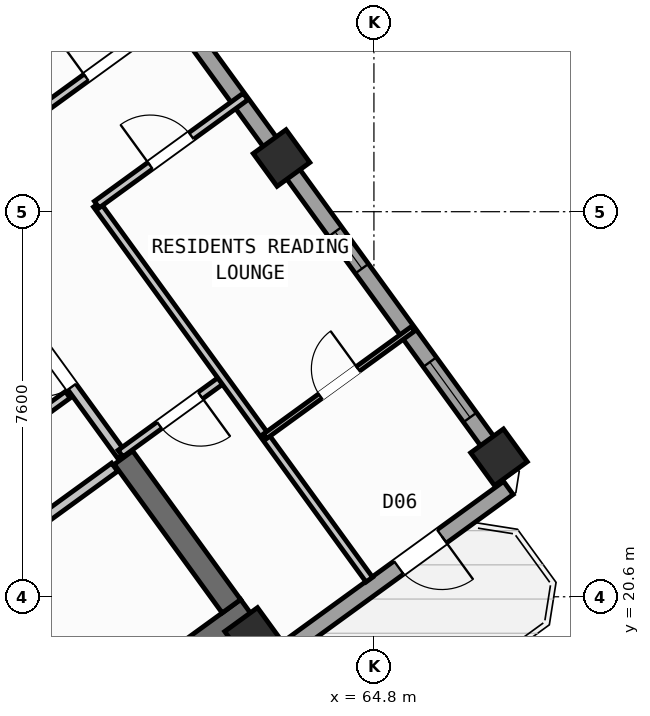
"""IFC4 building model, lengths in metres.
Left out: names, types, materials, properties, quantities, classifications, styles, units other than length and angle.
Written with IfcOpenShell. Run it as: python <this file> out.ifc"""

import sys

from ifc_helpers import new_model, si_unit, direction, frame, frame_2d, origin, origin_2d, place, context, subcontext, project, spatial, rectangle, hollow_rectangle, extrude, source, transform, mapped, element, fill, save


model = new_model("IFC4")
c1 = context("Model", 3, precision=1e-05, world=origin(), true_north=direction((0.0, 1.0)))
c2 = subcontext(c1, "Body", "Model", "MODEL_VIEW")
j1 = project(units=[si_unit("LENGTHUNIT", "METRE"), si_unit("PLANEANGLEUNIT", "RADIAN")], contexts=[c1])
p1 = place(None, origin())
s1 = spatial("IfcSite", under=j1, at=p1, CompositionType="ELEMENT")
p2 = place(p1, origin())
s2 = spatial("IfcBuilding", under=s1, at=p2, CompositionType="ELEMENT")
p3 = place(p2, frame((0.0, 0.0, 207.6)))
s3 = spatial("IfcBuildingStorey", under=s2, at=p3, CompositionType="ELEMENT", Elevation=207.6)
p4 = place(p3, frame((52.399, 13.169, 0.0), z_axis=(0.0, 0.0, 1.0), x_axis=(0.809022352778, 0.587777877013, 0.0)))
e1 = element("IfcWall", 1, at=p4, inside=s3, PredefinedType="SHEAR", context=c2, shape_type="SweptSolid", body=[
    extrude(rectangle(XDim=12.24, YDim=0.45, at=frame_2d((6.12, 0.0))), origin(), (0.0, 0.0, 1.0), 3.35),
])
p5 = place(p3, frame((61.988, 20.413, 0.0), z_axis=(0.0, 0.0, 1.0), x_axis=(-0.587819244441, 0.808992296542, 0.0)))
e2 = element("IfcWall", 2, at=p5, inside=s3, PredefinedType="SHEAR", context=c2, shape_type="SweptSolid", body=[
    extrude(rectangle(XDim=3.625, YDim=0.45, at=frame_2d((1.812, 0.0))), origin(), (0.0, 0.0, 1.0), 3.35),
])
m1 = source(origin(), c2, "Body", "SweptSolid", [
    extrude(hollow_rectangle(XDim=0.8, YDim=0.8, WallThickness=0.032, at=origin_2d()), origin(), (0.0, 0.0, 1.0), 3.6),
])
for number, where, z_axis, x_axis in (
    (3, (62.414, 19.827, 0.0), (0.0, 0.0, 1.0), (0.809, 0.588, 0.0)),
    (4, (67.268, 23.354, 0.0), (0.0, 0.0, 1.0), (0.809, 0.588, 0.0)),
    (5, (62.977, 29.259, 0.0), (0.0, 0.0, 1.0), (0.809, 0.588, 0.0)),
):
    element("IfcColumn", number, at=place(p3, frame(where, z_axis=z_axis, x_axis=x_axis)), inside=s3, PredefinedType="COLUMN", context=c2, shape_type="MappedRepresentation", body=[
        mapped(m1, transform((0.0, 0.0, 0.0), scale=1.0)),
    ])
p6 = place(p3, frame((54.81, 40.5, 0.0), z_axis=(0.0, 0.0, 1.0), x_axis=(0.587783625747, -0.809018176127, 0.0)))
e6 = element("IfcWall", 6, at=p6, inside=s3, PredefinedType="STANDARD", context=c2, shape_type="SweptSolid", body=[
    extrude(rectangle(XDim=21.587, YDim=0.32, at=frame_2d((10.794, 0.0))), origin(), (0.0, 0.0, 1.0), 2.825),
])
p7 = place(p6, frame((1.403, 0.0, 0.9)))
e7 = element("IfcOpeningElement", 7, at=p7, cuts=e6, PredefinedType="OPENING", context=c2, shape_type="SweptSolid", body=[
    extrude(rectangle(XDim=1.65, YDim=1.45, at=frame_2d((0.825, 0.725))), frame((0.0, 0.17, 0.0), z_axis=(0.0, -1.0, 0.0), x_axis=(1.0, 0.0, 0.0)), (0.0, 0.0, 1.0), 0.34),
])
p8 = place(p6, frame((4.695, 0.0, 1.0)))
e8 = element("IfcOpeningElement", 8, at=p8, cuts=e6, PredefinedType="OPENING", context=c2, shape_type="SweptSolid", body=[
    extrude(rectangle(XDim=0.9, YDim=1.25, at=frame_2d((0.45, 0.625))), frame((0.0, 0.17, 0.0), z_axis=(0.0, -1.0, 0.0), x_axis=(1.0, 0.0, 0.0)), (0.0, 0.0, 1.0), 0.34),
])
p9 = place(p6, frame((7.604, 0.0, 0.95)))
e9 = element("IfcOpeningElement", 9, at=p9, cuts=e6, PredefinedType="OPENING", context=c2, shape_type="SweptSolid", body=[
    extrude(rectangle(XDim=1.95, YDim=1.35, at=frame_2d((0.975, 0.675))), frame((0.0, 0.17, 0.0), z_axis=(0.0, -1.0, 0.0), x_axis=(1.0, 0.0, 0.0)), (0.0, 0.0, 1.0), 0.34),
])
p10 = place(p6, frame((15.692, 0.0, 1.0)))
e10 = element("IfcOpeningElement", 10, at=p10, cuts=e6, PredefinedType="OPENING", context=c2, shape_type="SweptSolid", body=[
    extrude(rectangle(XDim=0.9, YDim=1.25, at=frame_2d((0.45, 0.625))), frame((0.0, 0.17, 0.0), z_axis=(0.0, -1.0, 0.0), x_axis=(1.0, 0.0, 0.0)), (0.0, 0.0, 1.0), 0.34),
])
p11 = place(p6, frame((18.872, 0.0, 0.9)))
e11 = element("IfcOpeningElement", 11, at=p11, cuts=e6, PredefinedType="OPENING", context=c2, shape_type="SweptSolid", body=[
    extrude(rectangle(XDim=1.35, YDim=1.45, at=frame_2d((0.675, 0.725))), frame((0.0, 0.17, 0.0), z_axis=(0.0, -1.0, 0.0), x_axis=(1.0, 0.0, 0.0)), (0.0, 0.0, 1.0), 0.34),
])
p12 = place(p3, frame((67.454, 22.747, 0.0), z_axis=(0.0, 0.0, 1.0), x_axis=(-0.809021120468, -0.587779573171, 0.0)))
e12 = element("IfcWall", 12, at=p12, inside=s3, PredefinedType="STANDARD", context=c2, shape_type="SweptSolid", body=[
    extrude(rectangle(XDim=17.588, YDim=0.32, at=frame_2d((8.794, 0.0))), origin(), (0.0, 0.0, 1.0), 3.35),
])
p13 = place(p12, frame((1.624, 0.0, 0.0)))
e13 = element("IfcOpeningElement", 13, at=p13, cuts=e12, PredefinedType="OPENING", context=c2, shape_type="SweptSolid", body=[
    extrude(rectangle(XDim=1.05, YDim=2.15, at=frame_2d((0.525, 1.075))), frame((0.0, 0.17, 0.0), z_axis=(0.0, -1.0, 0.0), x_axis=(1.0, 0.0, 0.0)), (0.0, 0.0, 1.0), 0.34),
])
p14 = place(p12, frame((8.344, 0.0, 0.9)))
e14 = element("IfcOpeningElement", 14, at=p14, cuts=e12, PredefinedType="OPENING", context=c2, shape_type="SweptSolid", body=[
    extrude(rectangle(XDim=1.65, YDim=1.45, at=frame_2d((0.825, 0.725))), frame((0.0, 0.17, 0.0), z_axis=(0.0, -1.0, 0.0), x_axis=(1.0, 0.0, 0.0)), (0.0, 0.0, 1.0), 0.34),
])
p15 = place(p12, frame((13.594, 0.0, 0.9)))
e15 = element("IfcOpeningElement", 15, at=p15, cuts=e12, PredefinedType="OPENING", context=c2, shape_type="SweptSolid", body=[
    extrude(rectangle(XDim=1.65, YDim=1.45, at=frame_2d((0.825, 0.725))), frame((0.0, 0.17, 0.0), z_axis=(0.0, -1.0, 0.0), x_axis=(1.0, 0.0, 0.0)), (0.0, 0.0, 1.0), 0.34),
])
p16 = place(p3, frame((58.41, 18.327, 0.0), z_axis=(0.0, 0.0, 1.0), x_axis=(-0.58776738483, 0.809029975545, 0.0)))
e16 = element("IfcWall", 16, at=p16, inside=s3, PredefinedType="SHEAR", context=c2, shape_type="SweptSolid", body=[
    extrude(rectangle(XDim=3.16, YDim=0.26, at=frame_2d((1.58, 0.0))), origin(), (0.0, 0.0, 1.0), 3.35),
])
p17 = place(p3, frame((56.553, 20.884, 0.0), z_axis=(0.0, 0.0, 1.0), x_axis=(0.809041669066, 0.587751288995, 0.0)))
e17 = element("IfcWall", 17, at=p17, inside=s3, PredefinedType="STANDARD", context=c2, shape_type="SweptSolid", body=[
    extrude(rectangle(XDim=3.868, YDim=0.2, at=frame_2d((1.934, 0.0))), origin(), (0.0, 0.0, 1.0), 3.34),
])
p18 = place(p17, frame((0.55, 0.0, 0.0)))
e18 = element("IfcOpeningElement", 18, at=p18, cuts=e17, PredefinedType="OPENING", context=c2, shape_type="SweptSolid", body=[
    extrude(rectangle(XDim=0.86, YDim=2.05, at=frame_2d((0.43, 1.025))), frame((0.0, 0.11, 0.0), z_axis=(0.0, -1.0, 0.0), x_axis=(1.0, 0.0, 0.0)), (0.0, 0.0, 1.0), 0.22),
])
p19 = place(p3, frame((54.421, 21.436, 0.0), z_axis=(0.0, 0.0, 1.0), x_axis=(0.809013710463, 0.587789772183, 0.0)))
e19 = element("IfcWall", 19, at=p19, inside=s3, PredefinedType="PARTITIONING", context=c2, shape_type="SweptSolid", body=[
    extrude(rectangle(XDim=5.36, YDim=0.16, at=frame_2d((2.68, 0.0))), origin(), (0.0, 0.0, 1.0), 3.34),
])
p20 = place(p19, frame((1.4, 0.0, 0.0)))
e20 = element("IfcOpeningElement", 20, at=p20, cuts=e19, PredefinedType="OPENING", context=c2, shape_type="SweptSolid", body=[
    extrude(rectangle(XDim=0.86, YDim=2.05, at=frame_2d((0.43, 1.025))), frame((0.0, 0.09, 0.0), z_axis=(0.0, -1.0, 0.0), x_axis=(1.0, 0.0, 0.0)), (0.0, 0.0, 1.0), 0.18),
])
p21 = place(p3, frame((59.827, 23.386, 0.0), z_axis=(0.0, 0.0, 1.0), x_axis=(-0.587803840107, 0.809003489211, 0.0)))
e21 = element("IfcWall", 21, at=p21, inside=s3, PredefinedType="STANDARD", context=c2, shape_type="SweptSolid", body=[
    extrude(rectangle(XDim=2.96, YDim=0.2, at=frame_2d((1.48, 0.0))), origin(), (0.0, 0.0, 1.0), 3.34),
])
p22 = place(p21, frame((1.68, 0.0, 0.0)))
e22 = element("IfcOpeningElement", 22, at=p22, cuts=e21, PredefinedType="OPENING", context=c2, shape_type="SweptSolid", body=[
    extrude(rectangle(XDim=1.0, YDim=2.1, at=frame_2d((0.5, 1.05))), frame((0.0, 0.11, 0.0), z_axis=(0.0, -1.0, 0.0), x_axis=(1.0, 0.0, 0.0)), (0.0, 0.0, 1.0), 0.22),
])
p23 = place(p3, frame((59.798, 23.427, 0.0), z_axis=(0.0, 0.0, 1.0), x_axis=(0.809034604122, 0.587761013791, 0.0)))
e23 = element("IfcWall", 23, at=p23, inside=s3, PredefinedType="PARTITIONING", context=c2, shape_type="SweptSolid", body=[
    extrude(rectangle(XDim=2.51, YDim=0.16, at=frame_2d((1.255, 0.0))), origin(), (0.0, 0.0, 1.0), 3.34),
])
p24 = place(p23, frame((0.95, 0.0, 0.0)))
e24 = element("IfcOpeningElement", 24, at=p24, cuts=e23, PredefinedType="OPENING", context=c2, shape_type="SweptSolid", body=[
    extrude(rectangle(XDim=1.0, YDim=2.1, at=frame_2d((0.5, 1.05))), frame((0.0, 0.09, 0.0), z_axis=(0.0, -1.0, 0.0), x_axis=(1.0, 0.0, 0.0)), (0.0, 0.0, 1.0), 0.18),
])
p25 = place(p3, frame((64.709, 20.938, 0.0), z_axis=(0.0, 0.0, 1.0), x_axis=(-0.587776590479, 0.80902328748, 0.0)))
e25 = element("IfcWall", 25, at=p25, inside=s3, PredefinedType="PARTITIONING", context=c2, shape_type="SweptSolid", body=[
    extrude(rectangle(XDim=9.15, YDim=0.16, at=frame_2d((4.575, 0.0))), origin(), (0.0, 0.0, 1.0), 3.34),
])
p26 = place(p3, frame((59.331, 28.341, 0.0), z_axis=(0.0, 0.0, 1.0), x_axis=(0.809003564202, 0.587803736896, 0.0)))
e26 = element("IfcWall", 26, at=p26, inside=s3, PredefinedType="PARTITIONING", context=c2, shape_type="SweptSolid", body=[
    extrude(rectangle(XDim=3.63, YDim=0.16, at=frame_2d((1.815, 0.0))), origin(), (0.0, 0.0, 1.0), 3.34),
])
p27 = place(p26, frame((1.305, 0.0, 0.0)))
e27 = element("IfcOpeningElement", 27, at=p27, cuts=e26, PredefinedType="OPENING", context=c2, shape_type="SweptSolid", body=[
    extrude(rectangle(XDim=1.0, YDim=2.1, at=frame_2d((0.5, 1.05))), frame((0.0, 0.09, 0.0), z_axis=(0.0, -1.0, 0.0), x_axis=(1.0, 0.0, 0.0)), (0.0, 0.0, 1.0), 0.18),
])
p28 = place(p3, frame((58.067, 30.08, 0.0), z_axis=(0.0, 0.0, 1.0), x_axis=(0.809012309495, 0.587791700422, 0.0)))
e28 = element("IfcWall", 28, at=p28, inside=s3, PredefinedType="PARTITIONING", context=c2, shape_type="SweptSolid", body=[
    extrude(rectangle(XDim=3.63, YDim=0.16, at=frame_2d((1.815, 0.0))), origin(), (0.0, 0.0, 1.0), 3.34),
])
p29 = place(p28, frame((1.305, 0.0, 0.0)))
e29 = element("IfcOpeningElement", 29, at=p29, cuts=e28, PredefinedType="OPENING", context=c2, shape_type="SweptSolid", body=[
    extrude(rectangle(XDim=1.0, YDim=2.1, at=frame_2d((0.5, 1.05))), frame((0.0, 0.09, 0.0), z_axis=(0.0, -1.0, 0.0), x_axis=(1.0, 0.0, 0.0)), (0.0, 0.0, 1.0), 0.18),
])
p30 = place(p3, frame((62.653, 23.768, 0.0), z_axis=(0.0, 0.0, 1.0), x_axis=(0.809037198293, 0.58775744298, 0.0)))
e30 = element("IfcWall", 30, at=p30, inside=s3, PredefinedType="PARTITIONING", context=c2, shape_type="SweptSolid", body=[
    extrude(rectangle(XDim=3.61, YDim=0.11, at=frame_2d((1.805, 0.0))), origin(), (0.0, 0.0, 1.0), 3.34),
])
p31 = place(p30, frame((1.345, 0.0, 0.0)))
e31 = element("IfcOpeningElement", 31, at=p31, cuts=e30, PredefinedType="OPENING", context=c2, shape_type="SweptSolid", body=[
    extrude(rectangle(XDim=0.92, YDim=2.08, at=frame_2d((0.46, 1.04))), frame((0.0, 0.065, 0.0), z_axis=(0.0, -1.0, 0.0), x_axis=(1.0, 0.0, 0.0)), (0.0, 0.0, 1.0), 0.13),
])
m2 = source(origin(), c2, "Body", "SweptSolid", [
    extrude(rectangle(XDim=1.05, YDim=2.15, at=frame_2d((0.525, 1.075))), frame((0.0, 0.025, 0.0), z_axis=(0.0, -1.0, 0.0), x_axis=(1.0, 0.0, 0.0)), (0.0, 0.0, 1.0), 0.05),
])
p32 = place(p13, origin())
e32 = element("IfcDoor", 32, at=p32, inside=s3, OperationType="SINGLE_SWING_LEFT", PredefinedType="DOOR", context=c2, shape_type="MappedRepresentation", body=[
    mapped(m2, transform((0.0, 0.0, 0.0), scale=1.0)),
])
fill(e13, e32)
m3 = source(origin(), c2, "Body", "SweptSolid", [
    extrude(rectangle(XDim=0.9, YDim=1.25, at=frame_2d((0.45, 0.625))), frame((0.0, 0.03, 0.0), z_axis=(0.0, -1.0, 0.0), x_axis=(1.0, 0.0, 0.0)), (0.0, 0.0, 1.0), 0.06),
])
p33 = place(p10, origin())
e33 = element("IfcWindow", 33, at=p33, inside=s3, PartitioningType="SINGLE_PANEL", PredefinedType="WINDOW", context=c2, shape_type="MappedRepresentation", body=[
    mapped(m3, transform((0.0, 0.0, 0.0), scale=1.0)),
])
fill(e10, e33)
m4 = source(origin(), c2, "Body", "SweptSolid", [
    extrude(rectangle(XDim=1.35, YDim=1.45, at=frame_2d((0.675, 0.725))), frame((0.0, 0.03, 0.0), z_axis=(0.0, -1.0, 0.0), x_axis=(1.0, 0.0, 0.0)), (0.0, 0.0, 1.0), 0.06),
])
p34 = place(p11, origin())
e34 = element("IfcWindow", 34, at=p34, inside=s3, PartitioningType="SINGLE_PANEL", PredefinedType="WINDOW", context=c2, shape_type="MappedRepresentation", body=[
    mapped(m4, transform((0.0, 0.0, 0.0), scale=1.0)),
])
fill(e11, e34)
m5 = source(origin(), c2, "Body", "SweptSolid", [
    extrude(rectangle(XDim=1.0, YDim=2.1, at=frame_2d((0.5, 1.05))), frame((0.0, 0.025, 0.0), z_axis=(0.0, -1.0, 0.0), x_axis=(1.0, 0.0, 0.0)), (0.0, 0.0, 1.0), 0.05),
])
p35 = place(p24, frame((1.0, 0.0, 0.0), z_axis=(0.0, 0.0, 1.0), x_axis=(-1.0, 0.0, 0.0)))
e35 = element("IfcDoor", 35, at=p35, inside=s3, OperationType="SINGLE_SWING_LEFT", PredefinedType="DOOR", context=c2, shape_type="MappedRepresentation", body=[
    mapped(m5, transform((0.0, 0.0, 0.0), scale=1.0)),
])
fill(e24, e35)
p36 = place(p22, origin())
e36 = element("IfcDoor", 36, at=p36, inside=s3, OperationType="SINGLE_SWING_RIGHT", PredefinedType="DOOR", context=c2, shape_type="MappedRepresentation", body=[
    mapped(m5, transform((0.0, 0.0, 0.0), scale=1.0)),
])
fill(e22, e36)
p37 = place(p29, origin())
e37 = element("IfcDoor", 37, at=p37, inside=s3, OperationType="SINGLE_SWING_LEFT", PredefinedType="DOOR", context=c2, shape_type="MappedRepresentation", body=[
    mapped(m5, transform((0.0, 0.0, 0.0), scale=1.0)),
])
fill(e29, e37)
p38 = place(p27, origin())
e38 = element("IfcDoor", 38, at=p38, inside=s3, OperationType="SINGLE_SWING_LEFT", PredefinedType="DOOR", context=c2, shape_type="MappedRepresentation", body=[
    mapped(m5, transform((0.0, 0.0, 0.0), scale=1.0)),
])
fill(e27, e38)
m6 = source(origin(), c2, "Body", "SweptSolid", [
    extrude(rectangle(XDim=0.92, YDim=2.08, at=frame_2d((0.46, 1.04))), frame((0.0, 0.025, 0.0), z_axis=(0.0, -1.0, 0.0), x_axis=(1.0, 0.0, 0.0)), (0.0, 0.0, 1.0), 0.05),
])
p39 = place(p31, origin())
e39 = element("IfcDoor", 39, at=p39, inside=s3, OperationType="SINGLE_SWING_RIGHT", PredefinedType="DOOR", context=c2, shape_type="MappedRepresentation", body=[
    mapped(m6, transform((0.0, 0.0, 0.0), scale=1.0)),
])
fill(e31, e39)
save(model, sys.argv[1])
